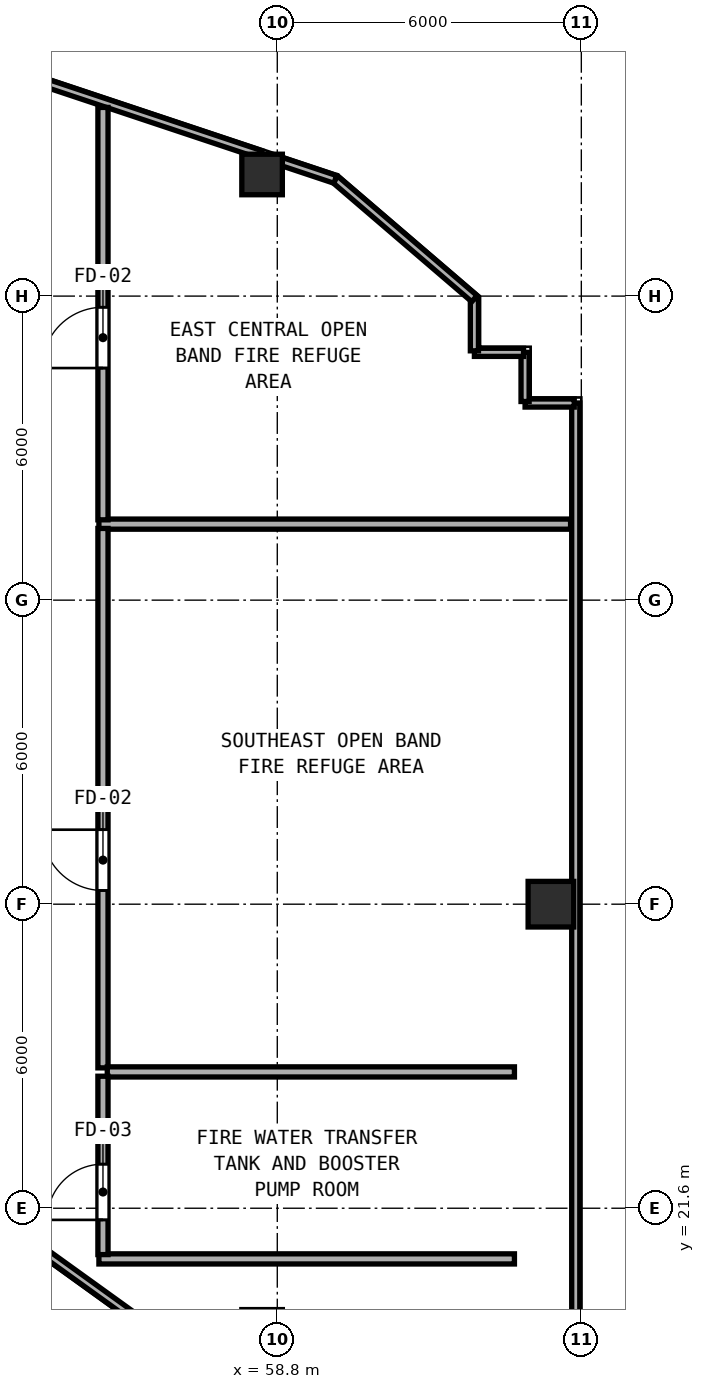
"""IFC4 building model, lengths in metres.
Left out: names, types, materials, properties, quantities, classifications, styles, units other than length and angle.
Written with IfcOpenShell. Run it as: python <this file> out.ifc"""

import sys

from ifc_helpers import new_model, si_unit, direction, frame, frame_2d, origin, origin_2d, place, context, subcontext, project, spatial, rectangle, hollow_rectangle, extrude, element, fill, save


model = new_model("IFC4")
c1 = context("Model", 3, precision=1e-05, world=origin(), true_north=direction((0.0, 1.0)))
c2 = subcontext(c1, "Body", "Model", "MODEL_VIEW")
j1 = project(units=[si_unit("LENGTHUNIT", "METRE"), si_unit("PLANEANGLEUNIT", "RADIAN")], contexts=[c1])
p1 = place(None, origin())
s1 = spatial("IfcSite", under=j1, at=p1, CompositionType="ELEMENT")
p2 = place(p1, origin())
s2 = spatial("IfcBuilding", under=s1, at=p2, CompositionType="ELEMENT")
p3 = place(p2, frame((0.0, 0.0, 230.6)))
s3 = spatial("IfcBuildingStorey", under=s2, at=p3, CompositionType="ELEMENT", Elevation=230.6)
p4 = place(p3, frame((64.2, 27.6, 0.0), z_axis=(0.0, 0.0, 1.0), x_axis=(1.0, 0.0, 0.0)))
e1 = element("IfcColumn", 1, at=p4, inside=s3, PredefinedType="COLUMN", context=c2, shape_type="SweptSolid", body=[
    extrude(hollow_rectangle(XDim=0.9, YDim=0.9, WallThickness=0.034, at=origin_2d()), origin(), (0.0, 0.0, 1.0), 4.6),
])
p5 = place(p3, frame((58.5, 42.0, 0.0), z_axis=(0.0, 0.0, 1.0), x_axis=(1.0, 0.0, 0.0)))
e2 = element("IfcColumn", 2, at=p5, inside=s3, PredefinedType="COLUMN", context=c2, shape_type="SweptSolid", body=[
    extrude(hollow_rectangle(XDim=0.8, YDim=0.8, WallThickness=0.03, at=origin_2d()), origin(), (0.0, 0.0, 1.0), 4.6),
])
p6 = place(p3, frame((53.242, 21.417, 0.0), z_axis=(0.0, 0.0, 1.0), x_axis=(0.811537125723, -0.584300858782, 0.0)))
e3 = element("IfcWall", 3, at=p6, inside=s3, PredefinedType="PARAPET", context=c2, shape_type="SweptSolid", body=[
    extrude(rectangle(XDim=11.642, YDim=0.16, at=frame_2d((5.821, 0.0))), origin(), (0.0, 0.0, 1.0), 1.15),
])
p7 = place(p3, frame((64.69, 16.51, 0.0), z_axis=(0.0, 0.0, 1.0), x_axis=(0.0, 1.0, 0.0)))
e4 = element("IfcWall", 4, at=p7, inside=s3, PredefinedType="PARAPET", context=c2, shape_type="SweptSolid", body=[
    extrude(rectangle(XDim=20.98, YDim=0.16, at=frame_2d((10.49, 0.0))), origin(), (0.0, 0.0, 1.0), 1.15),
])
for number, where, z_axis, x_axis in (
    (5, (64.66, 37.49, 0.0), (0.0, 0.0, 1.0), (-1.0, 0.0, 0.0)),
    (6, (63.69, 37.52, 0.0), (0.0, 0.0, 1.0), (0.0, 1.0, 0.0)),
    (7, (63.66, 38.49, 0.0), (0.0, 0.0, 1.0), (-1.0, 0.0, 0.0)),
):
    element("IfcWall", number, at=place(p3, frame(where, z_axis=z_axis, x_axis=x_axis)), inside=s3, PredefinedType="PARAPET", context=c2, shape_type="SweptSolid", body=[
        extrude(rectangle(XDim=0.97, YDim=0.16, at=frame_2d((0.485, 0.0))), origin(), (0.0, 0.0, 1.0), 1.15),
    ])
p8 = place(p3, frame((62.69, 38.52, 0.0), z_axis=(0.0, 0.0, 1.0), x_axis=(0.0, 1.0, 0.0)))
e8 = element("IfcWall", 8, at=p8, inside=s3, PredefinedType="PARAPET", context=c2, shape_type="SweptSolid", body=[
    extrude(rectangle(XDim=1.029, YDim=0.16, at=frame_2d((0.515, 0.0))), origin(), (0.0, 0.0, 1.0), 1.15),
])
p9 = place(p3, frame((62.69, 39.549, 0.0), z_axis=(0.0, 0.0, 1.0), x_axis=(-0.759213704594, 0.650841417518, 0.0)))
e9 = element("IfcWall", 9, at=p9, inside=s3, PredefinedType="PARAPET", context=c2, shape_type="SweptSolid", body=[
    extrude(rectangle(XDim=3.616, YDim=0.16, at=frame_2d((1.808, 0.0))), origin(), (0.0, 0.0, 1.0), 1.15),
])
p10 = place(p3, frame((59.945, 41.903, 0.0), z_axis=(0.0, 0.0, 1.0), x_axis=(-0.948705297269, 0.316161760709, 0.0)))
e10 = element("IfcWall", 10, at=p10, inside=s3, PredefinedType="PARAPET", context=c2, shape_type="SweptSolid", body=[
    extrude(rectangle(XDim=1.11, YDim=0.16, at=frame_2d((0.555, 0.0))), origin(), (0.0, 0.0, 1.0), 1.15),
])
p11 = place(p3, frame((58.476, 42.392, 0.0), z_axis=(0.0, 0.0, 1.0), x_axis=(-0.948687300706, 0.316215757798, 0.0)))
e11 = element("IfcWall", 11, at=p11, inside=s3, PredefinedType="PARAPET", context=c2, shape_type="SweptSolid", body=[
    extrude(rectangle(XDim=6.099, YDim=0.16, at=frame_2d((3.05, 0.0))), origin(), (0.0, 0.0, 1.0), 1.15),
])
p12 = place(p3, frame((55.28, 35.1, 0.0), z_axis=(0.0, 0.0, 1.0), x_axis=(1.0, 0.0, 0.0)))
e12 = element("IfcWall", 12, at=p12, inside=s3, PredefinedType="SOLIDWALL", context=c2, shape_type="SweptSolid", body=[
    extrude(rectangle(XDim=9.308, YDim=0.2, at=frame_2d((4.654, 0.0))), origin(), (0.0, 0.0, 1.0), 4.35),
])
p13 = place(p3, frame((55.36, 24.37, 0.0), z_axis=(0.0, 0.0, 1.0), x_axis=(0.0, 1.0, 0.0)))
e13 = element("IfcWall", 13, at=p13, inside=s3, PredefinedType="SOLIDWALL", context=c2, shape_type="SweptSolid", body=[
    extrude(rectangle(XDim=10.645, YDim=0.2, at=frame_2d((5.322, 0.0))), origin(), (0.0, 0.0, 1.0), 4.35),
])
p14 = place(p13, frame((3.5, 0.0, 0.0)))
e14 = element("IfcOpeningElement", 14, at=p14, cuts=e13, PredefinedType="OPENING", context=c2, shape_type="SweptSolid", body=[
    extrude(rectangle(XDim=1.2, YDim=2.15, at=frame_2d((0.6, 1.075))), frame((0.0, 0.11, 0.0), z_axis=(0.0, -1.0, 0.0), x_axis=(1.0, 0.0, 0.0)), (0.0, 0.0, 1.0), 0.22),
])
p15 = place(p3, frame((55.36, 35.185, 0.0), z_axis=(0.0, 0.0, 1.0), x_axis=(0.0, 1.0, 0.0)))
e15 = element("IfcWall", 15, at=p15, inside=s3, PredefinedType="SOLIDWALL", context=c2, shape_type="SweptSolid", body=[
    extrude(rectangle(XDim=8.138, YDim=0.2, at=frame_2d((4.069, 0.0))), origin(), (0.0, 0.0, 1.0), 4.35),
])
p16 = place(p15, frame((2.995, 0.0, 0.0)))
e16 = element("IfcOpeningElement", 16, at=p16, cuts=e15, PredefinedType="OPENING", context=c2, shape_type="SweptSolid", body=[
    extrude(rectangle(XDim=1.2, YDim=2.15, at=frame_2d((0.6, 1.075))), frame((0.0, 0.11, 0.0), z_axis=(0.0, -1.0, 0.0), x_axis=(1.0, 0.0, 0.0)), (0.0, 0.0, 1.0), 0.22),
])
p17 = place(p3, frame((55.445, 24.29, 0.0), z_axis=(0.0, 0.0, 1.0), x_axis=(1.0, 0.0, 0.0)))
e17 = element("IfcWall", 17, at=p17, inside=s3, PredefinedType="SOLIDWALL", context=c2, shape_type="SweptSolid", body=[
    extrude(rectangle(XDim=8.035, YDim=0.2, at=frame_2d((4.018, 0.0))), origin(), (0.0, 0.0, 1.0), 4.35),
])
p18 = place(p3, frame((55.28, 20.6, 0.0), z_axis=(0.0, 0.0, 1.0), x_axis=(1.0, 0.0, 0.0)))
e18 = element("IfcWall", 18, at=p18, inside=s3, PredefinedType="SOLIDWALL", context=c2, shape_type="SweptSolid", body=[
    extrude(rectangle(XDim=8.2, YDim=0.2, at=frame_2d((4.1, 0.0))), origin(), (0.0, 0.0, 1.0), 4.35),
])
p19 = place(p3, frame((55.36, 20.685, 0.0), z_axis=(0.0, 0.0, 1.0), x_axis=(0.0, 1.0, 0.0)))
e19 = element("IfcWall", 19, at=p19, inside=s3, PredefinedType="SOLIDWALL", context=c2, shape_type="SweptSolid", body=[
    extrude(rectangle(XDim=3.52, YDim=0.2, at=frame_2d((1.76, 0.0))), origin(), (0.0, 0.0, 1.0), 4.35),
])
p20 = place(p19, frame((0.685, 0.0, 0.0)))
e20 = element("IfcOpeningElement", 20, at=p20, cuts=e19, PredefinedType="OPENING", context=c2, shape_type="SweptSolid", body=[
    extrude(rectangle(XDim=1.1, YDim=2.15, at=frame_2d((0.55, 1.075))), frame((0.0, 0.11, 0.0), z_axis=(0.0, -1.0, 0.0), x_axis=(1.0, 0.0, 0.0)), (0.0, 0.0, 1.0), 0.22),
])
p21 = place(p14, origin())
e21 = element("IfcDoor", 21, at=p21, inside=s3, OperationType="SINGLE_SWING_RIGHT", PredefinedType="DOOR", context=c2, shape_type="SweptSolid", body=[
    extrude(rectangle(XDim=1.2, YDim=2.15, at=frame_2d((0.6, 1.075))), frame((0.0, 0.025, 0.0), z_axis=(0.0, -1.0, 0.0), x_axis=(1.0, 0.0, 0.0)), (0.0, 0.0, 1.0), 0.05),
])
fill(e14, e21)
p22 = place(p16, origin())
e22 = element("IfcDoor", 22, at=p22, inside=s3, OperationType="SINGLE_SWING_LEFT", PredefinedType="DOOR", context=c2, shape_type="SweptSolid", body=[
    extrude(rectangle(XDim=1.2, YDim=2.15, at=frame_2d((0.6, 1.075))), frame((0.0, 0.025, 0.0), z_axis=(0.0, -1.0, 0.0), x_axis=(1.0, 0.0, 0.0)), (0.0, 0.0, 1.0), 0.05),
])
fill(e16, e22)
p23 = place(p20, origin())
e23 = element("IfcDoor", 23, at=p23, inside=s3, OperationType="SINGLE_SWING_LEFT", PredefinedType="DOOR", context=c2, shape_type="SweptSolid", body=[
    extrude(rectangle(XDim=1.1, YDim=2.15, at=frame_2d((0.55, 1.075))), frame((0.0, 0.025, 0.0), z_axis=(0.0, -1.0, 0.0), x_axis=(1.0, 0.0, 0.0)), (0.0, 0.0, 1.0), 0.05),
])
fill(e20, e23)
save(model, sys.argv[1])
